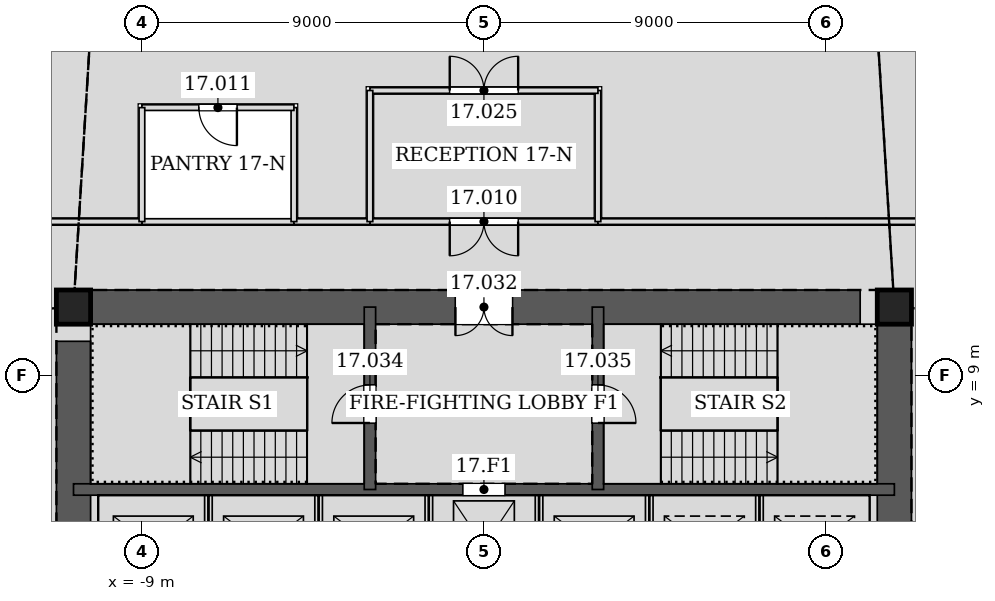
"""IFC4 building model, lengths in metres.
Left out: names, types, materials, properties, quantities, classifications, styles, units other than length and angle.
Written with IfcOpenShell. Run it as: python <this file> out.ifc"""

import sys

from ifc_helpers import new_model, si_unit, direction, frame, frame_2d, origin, origin_2d, place, context, subcontext, project, spatial, rectangle, hollow_rectangle, extrude, element, fill, save


model = new_model("IFC4")
c1 = context("Model", 3, precision=1e-05, world=origin(), true_north=direction((0.0, 1.0)))
c2 = subcontext(c1, "Body", "Model", "MODEL_VIEW")
j1 = project(units=[si_unit("LENGTHUNIT", "METRE"), si_unit("PLANEANGLEUNIT", "RADIAN")], contexts=[c1])
p1 = place(None, origin())
s1 = spatial("IfcSite", under=j1, at=p1, CompositionType="ELEMENT")
p2 = place(p1, origin())
s2 = spatial("IfcBuilding", under=s1, at=p2, CompositionType="ELEMENT")
p3 = place(p2, frame((0.0, 0.0, 79.2)))
s3 = spatial("IfcBuildingStorey", under=s2, at=p3, CompositionType="ELEMENT", Elevation=79.2)
for number, where, z_axis, x_axis in (
    (1, (10.8, 10.8, 0.0), (0.0, 0.0, 1.0), (1.0, 0.0, 0.0)),
    (2, (-10.8, 10.8, 0.0), (0.0, 0.0, 1.0), (1.0, 0.0, 0.0)),
):
    element("IfcColumn", number, at=place(p3, frame(where, z_axis=z_axis, x_axis=x_axis)), inside=s3, PredefinedType="COLUMN", context=c2, shape_type="SweptSolid", body=[
        extrude(hollow_rectangle(XDim=0.9, YDim=0.9, WallThickness=0.06, at=origin_2d()), origin(), (0.0, 0.0, 1.0), 4.2),
    ])
p4 = place(p3, frame((10.8, -10.8, 0.0), z_axis=(0.0, 0.0, 1.0), x_axis=(0.0, 1.0, 0.0)))
e3 = element("IfcWall", 3, at=p4, inside=s3, PredefinedType="SOLIDWALL", context=c2, shape_type="SweptSolid", body=[
    extrude(rectangle(XDim=21.6, YDim=0.9, at=frame_2d((10.8, 0.0))), origin(), (0.0, 0.0, 1.0), 4.2),
])
p5 = place(p4, frame((11.7, 0.0, 0.0)))
e4 = element("IfcOpeningElement", 4, at=p5, cuts=e3, PredefinedType="OPENING", context=c2, shape_type="SweptSolid", body=[
    extrude(rectangle(XDim=1.2, YDim=2.1, at=frame_2d((0.6, 1.05))), frame((0.0, 0.46, 0.0), z_axis=(0.0, -1.0, 0.0), x_axis=(1.0, 0.0, 0.0)), (0.0, 0.0, 1.0), 0.92),
])
p6 = place(p4, frame((8.7, 0.0, 0.0)))
e5 = element("IfcOpeningElement", 5, at=p6, cuts=e3, PredefinedType="OPENING", context=c2, shape_type="SweptSolid", body=[
    extrude(rectangle(XDim=1.2, YDim=2.1, at=frame_2d((0.6, 1.05))), frame((0.0, 0.46, 0.0), z_axis=(0.0, -1.0, 0.0), x_axis=(1.0, 0.0, 0.0)), (0.0, 0.0, 1.0), 0.92),
])
p7 = place(p3, frame((10.8, 10.8, 0.0), z_axis=(0.0, 0.0, 1.0), x_axis=(-1.0, 0.0, 0.0)))
e6 = element("IfcWall", 6, at=p7, inside=s3, PredefinedType="SOLIDWALL", context=c2, shape_type="SweptSolid", body=[
    extrude(rectangle(XDim=21.6, YDim=0.9, at=frame_2d((10.8, 0.0))), origin(), (0.0, 0.0, 1.0), 4.2),
])
p8 = place(p7, frame((10.05, 0.0, 0.0)))
e7 = element("IfcOpeningElement", 7, at=p8, cuts=e6, PredefinedType="OPENING", context=c2, shape_type="SweptSolid", body=[
    extrude(rectangle(XDim=1.5, YDim=2.1, at=frame_2d((0.75, 1.05))), frame((0.0, 0.46, 0.0), z_axis=(0.0, -1.0, 0.0), x_axis=(1.0, 0.0, 0.0)), (0.0, 0.0, 1.0), 0.92),
])
p9 = place(p3, frame((-10.8, 10.8, 0.0), z_axis=(0.0, 0.0, 1.0), x_axis=(0.0, -1.0, 0.0)))
e8 = element("IfcWall", 8, at=p9, inside=s3, PredefinedType="SOLIDWALL", context=c2, shape_type="SweptSolid", body=[
    extrude(rectangle(XDim=21.6, YDim=0.9, at=frame_2d((10.8, 0.0))), origin(), (0.0, 0.0, 1.0), 4.2),
])
p10 = place(p9, frame((8.7, 0.0, 0.0)))
e9 = element("IfcOpeningElement", 9, at=p10, cuts=e8, PredefinedType="OPENING", context=c2, shape_type="SweptSolid", body=[
    extrude(rectangle(XDim=1.2, YDim=2.1, at=frame_2d((0.6, 1.05))), frame((0.0, 0.46, 0.0), z_axis=(0.0, -1.0, 0.0), x_axis=(1.0, 0.0, 0.0)), (0.0, 0.0, 1.0), 0.92),
])
p11 = place(p9, frame((11.7, 0.0, 0.0)))
e10 = element("IfcOpeningElement", 10, at=p11, cuts=e8, PredefinedType="OPENING", context=c2, shape_type="SweptSolid", body=[
    extrude(rectangle(XDim=1.2, YDim=2.1, at=frame_2d((0.6, 1.05))), frame((0.0, 0.46, 0.0), z_axis=(0.0, -1.0, 0.0), x_axis=(1.0, 0.0, 0.0)), (0.0, 0.0, 1.0), 0.92),
])
p12 = place(p3, frame((-10.8, 6.0, 0.0), z_axis=(0.0, 0.0, 1.0), x_axis=(1.0, 0.0, 0.0)))
e11 = element("IfcWall", 11, at=p12, inside=s3, PredefinedType="SOLIDWALL", context=c2, shape_type="SweptSolid", body=[
    extrude(rectangle(XDim=21.6, YDim=0.3, at=frame_2d((10.8, 0.0))), origin(), (0.0, 0.0, 1.0), 4.2),
])
p13 = place(p12, frame((10.25, 0.0, 0.0)))
e12 = element("IfcOpeningElement", 12, at=p13, cuts=e11, PredefinedType="OPENING", context=c2, shape_type="SweptSolid", body=[
    extrude(rectangle(XDim=1.1, YDim=2.1, at=frame_2d((0.55, 1.05))), frame((0.0, 0.16, 0.0), z_axis=(0.0, -1.0, 0.0), x_axis=(1.0, 0.0, 0.0)), (0.0, 0.0, 1.0), 0.32),
])
p14 = place(p3, frame((-3.0, 6.0, 0.0), z_axis=(0.0, 0.0, 1.0), x_axis=(0.0, 1.0, 0.0)))
e13 = element("IfcWall", 13, at=p14, inside=s3, PredefinedType="SOLIDWALL", context=c2, shape_type="SweptSolid", body=[
    extrude(rectangle(XDim=4.8, YDim=0.3, at=frame_2d((2.4, 0.0))), origin(), (0.0, 0.0, 1.0), 4.2),
])
p15 = place(p14, frame((1.75, 0.0, 0.0)))
e14 = element("IfcOpeningElement", 14, at=p15, cuts=e13, PredefinedType="OPENING", context=c2, shape_type="SweptSolid", body=[
    extrude(rectangle(XDim=1.0, YDim=2.1, at=frame_2d((0.5, 1.05))), frame((0.0, 0.16, 0.0), z_axis=(0.0, -1.0, 0.0), x_axis=(1.0, 0.0, 0.0)), (0.0, 0.0, 1.0), 0.32),
])
p16 = place(p3, frame((3.0, 6.0, 0.0), z_axis=(0.0, 0.0, 1.0), x_axis=(0.0, 1.0, 0.0)))
e15 = element("IfcWall", 15, at=p16, inside=s3, PredefinedType="SOLIDWALL", context=c2, shape_type="SweptSolid", body=[
    extrude(rectangle(XDim=4.8, YDim=0.3, at=frame_2d((2.4, 0.0))), origin(), (0.0, 0.0, 1.0), 4.2),
])
p17 = place(p16, frame((1.75, 0.0, 0.0)))
e16 = element("IfcOpeningElement", 16, at=p17, cuts=e15, PredefinedType="OPENING", context=c2, shape_type="SweptSolid", body=[
    extrude(rectangle(XDim=1.0, YDim=2.1, at=frame_2d((0.5, 1.05))), frame((0.0, 0.16, 0.0), z_axis=(0.0, -1.0, 0.0), x_axis=(1.0, 0.0, 0.0)), (0.0, 0.0, 1.0), 0.32),
])
p18 = place(p3, frame((3.001, 13.05, 0.0), z_axis=(0.0, 0.0, 1.0), x_axis=(-1.0, 0.0, 0.0)))
e17 = element("IfcWall", 17, at=p18, inside=s3, PredefinedType="PARTITIONING", context=c2, shape_type="SweptSolid", body=[
    extrude(rectangle(XDim=6.002, YDim=0.15, at=frame_2d((3.001, 0.0))), origin(), (0.0, 0.0, 1.0), 3.065),
])
p19 = place(p18, frame((2.101, 0.0, 0.0)))
e18 = element("IfcOpeningElement", 18, at=p19, cuts=e17, PredefinedType="OPENING", context=c2, shape_type="SweptSolid", body=[
    extrude(rectangle(XDim=1.8, YDim=2.4, at=frame_2d((0.9, 1.2))), frame((0.0, 0.085, 0.0), z_axis=(0.0, -1.0, 0.0), x_axis=(1.0, 0.0, 0.0)), (0.0, 0.0, 1.0), 0.17),
])
p20 = place(p3, frame((-4.999, 13.05, 0.0), z_axis=(0.0, 0.0, 1.0), x_axis=(-1.0, 0.0, 0.0)))
e19 = element("IfcWall", 19, at=p20, inside=s3, PredefinedType="PARTITIONING", context=c2, shape_type="SweptSolid", body=[
    extrude(rectangle(XDim=4.002, YDim=0.15, at=frame_2d((2.001, 0.0))), origin(), (0.0, 0.0, 1.0), 4.035),
])
p21 = place(p3, frame((-8.999, 13.05, 0.0), z_axis=(0.0, 0.0, 1.0), x_axis=(-1.0, 0.0, 0.0)))
e20 = element("IfcWall", 20, at=p21, inside=s3, PredefinedType="PARTITIONING", context=c2, shape_type="SweptSolid", body=[
    extrude(rectangle(XDim=4.051, YDim=0.15, at=frame_2d((2.025, 0.0))), origin(), (0.0, 0.0, 1.0), 3.014),
])
p22 = place(p3, frame((-2.999, 13.05, 0.0), z_axis=(0.0, 0.0, 1.0), x_axis=(-1.0, 0.0, 0.0)))
e21 = element("IfcWall", 21, at=p22, inside=s3, PredefinedType="PARTITIONING", context=c2, shape_type="SweptSolid", body=[
    extrude(rectangle(XDim=2.002, YDim=0.15, at=frame_2d((1.001, 0.0))), origin(), (0.0, 0.0, 1.0), 4.035),
])
p23 = place(p3, frame((13.05, 13.05, 0.0), z_axis=(0.0, 0.0, 1.0), x_axis=(-1.0, 0.0, 0.0)))
e22 = element("IfcWall", 22, at=p23, inside=s3, PredefinedType="PARTITIONING", context=c2, shape_type="SweptSolid", body=[
    extrude(rectangle(XDim=10.051, YDim=0.15, at=frame_2d((5.025, 0.0))), origin(), (0.0, 0.0, 1.0), 3.014),
])
p24 = place(p3, frame((3.0, 13.05, 0.0), z_axis=(0.0, 0.0, 1.0), x_axis=(0.0, 1.0, 0.0)))
e23 = element("IfcWall", 23, at=p24, inside=s3, PredefinedType="PARTITIONING", context=c2, shape_type="SweptSolid", body=[
    extrude(rectangle(XDim=3.45, YDim=0.15, at=frame_2d((1.725, 0.0))), origin(), (0.0, 0.0, 1.0), 3.492),
])
p25 = place(p3, frame((3.0, 16.5, 0.0), z_axis=(0.0, 0.0, 1.0), x_axis=(-1.0, 0.0, 0.0)))
e24 = element("IfcWall", 24, at=p25, inside=s3, PredefinedType="PARTITIONING", context=c2, shape_type="SweptSolid", body=[
    extrude(rectangle(XDim=6.0, YDim=0.15, at=frame_2d((3.0, 0.0))), origin(), (0.0, 0.0, 1.0), 3.065),
])
p26 = place(p25, frame((2.1, 0.0, 0.0)))
e25 = element("IfcOpeningElement", 25, at=p26, cuts=e24, PredefinedType="OPENING", context=c2, shape_type="SweptSolid", body=[
    extrude(rectangle(XDim=1.8, YDim=2.4, at=frame_2d((0.9, 1.2))), frame((0.0, 0.085, 0.0), z_axis=(0.0, -1.0, 0.0), x_axis=(1.0, 0.0, 0.0)), (0.0, 0.0, 1.0), 0.17),
])
p27 = place(p3, frame((-3.0, 16.5, 0.0), z_axis=(0.0, 0.0, 1.0), x_axis=(0.0, -1.0, 0.0)))
e26 = element("IfcWall", 26, at=p27, inside=s3, PredefinedType="PARTITIONING", context=c2, shape_type="SweptSolid", body=[
    extrude(rectangle(XDim=3.45, YDim=0.15, at=frame_2d((1.725, 0.0))), origin(), (0.0, 0.0, 1.0), 3.492),
])
p28 = place(p3, frame((-5.0, 13.05, 0.0), z_axis=(0.0, 0.0, 1.0), x_axis=(0.0, 1.0, 0.0)))
e27 = element("IfcWall", 27, at=p28, inside=s3, PredefinedType="PARTITIONING", context=c2, shape_type="SweptSolid", body=[
    extrude(rectangle(XDim=3.0, YDim=0.15, at=frame_2d((1.5, 0.0))), origin(), (0.0, 0.0, 1.0), 3.492),
])
p29 = place(p3, frame((-5.0, 16.05, 0.0), z_axis=(0.0, 0.0, 1.0), x_axis=(-1.0, 0.0, 0.0)))
e28 = element("IfcWall", 28, at=p29, inside=s3, PredefinedType="PARTITIONING", context=c2, shape_type="SweptSolid", body=[
    extrude(rectangle(XDim=4.0, YDim=0.15, at=frame_2d((2.0, 0.0))), origin(), (0.0, 0.0, 1.0), 4.035),
])
p30 = place(p29, frame((1.5, 0.0, 0.0)))
e29 = element("IfcOpeningElement", 29, at=p30, cuts=e28, PredefinedType="OPENING", context=c2, shape_type="SweptSolid", body=[
    extrude(rectangle(XDim=1.0, YDim=2.1, at=frame_2d((0.5, 1.05))), frame((0.0, 0.085, 0.0), z_axis=(0.0, -1.0, 0.0), x_axis=(1.0, 0.0, 0.0)), (0.0, 0.0, 1.0), 0.17),
])
p31 = place(p3, frame((-9.0, 16.05, 0.0), z_axis=(0.0, 0.0, 1.0), x_axis=(0.0, -1.0, 0.0)))
e30 = element("IfcWall", 30, at=p31, inside=s3, PredefinedType="PARTITIONING", context=c2, shape_type="SweptSolid", body=[
    extrude(rectangle(XDim=3.0, YDim=0.15, at=frame_2d((1.5, 0.0))), origin(), (0.0, 0.0, 1.0), 3.492),
])
for number, where, z_axis, x_axis in (
    (31, (-7.25, 3.15, 0.0), (0.0, 0.0, 1.0), (0.0, 1.0, 0.0)),
    (32, (-4.35, 3.15, 0.0), (0.0, 0.0, 1.0), (0.0, 1.0, 0.0)),
    (33, (-1.45, 3.15, 0.0), (0.0, 0.0, 1.0), (0.0, 1.0, 0.0)),
    (34, (1.45, 3.15, 0.0), (0.0, 0.0, 1.0), (0.0, 1.0, 0.0)),
    (35, (4.35, 3.15, 0.0), (0.0, 0.0, 1.0), (0.0, 1.0, 0.0)),
    (36, (7.25, 3.15, 0.0), (0.0, 0.0, 1.0), (0.0, 1.0, 0.0)),
):
    element("IfcWall", number, at=place(p3, frame(where, z_axis=z_axis, x_axis=x_axis)), inside=s3, PredefinedType="PARTITIONING", context=c2, shape_type="SweptSolid", body=[
        extrude(rectangle(XDim=2.7, YDim=0.2, at=frame_2d((1.35, 0.0))), origin(), (0.0, 0.0, 1.0), 4.2),
    ])
p32 = place(p19, origin())
e37 = element("IfcDoor", 37, at=p32, inside=s3, OperationType="DOUBLE_DOOR_SINGLE_SWING", PredefinedType="DOOR", context=c2, shape_type="SweptSolid", body=[
    extrude(rectangle(XDim=1.8, YDim=2.4, at=frame_2d((0.9, 1.2))), frame((0.0, 0.025, 0.0), z_axis=(0.0, -1.0, 0.0), x_axis=(1.0, 0.0, 0.0)), (0.0, 0.0, 1.0), 0.05),
])
fill(e18, e37)
p33 = place(p30, origin())
e38 = element("IfcDoor", 38, at=p33, inside=s3, OperationType="SINGLE_SWING_LEFT", PredefinedType="DOOR", context=c2, shape_type="SweptSolid", body=[
    extrude(rectangle(XDim=1.0, YDim=2.1, at=frame_2d((0.5, 1.05))), frame((0.0, 0.025, 0.0), z_axis=(0.0, -1.0, 0.0), x_axis=(1.0, 0.0, 0.0)), (0.0, 0.0, 1.0), 0.05),
])
fill(e29, e38)
p34 = place(p26, frame((1.8, 0.0, 0.0), z_axis=(0.0, 0.0, 1.0), x_axis=(-1.0, 0.0, 0.0)))
e39 = element("IfcDoor", 39, at=p34, inside=s3, OperationType="DOUBLE_DOOR_SINGLE_SWING", PredefinedType="DOOR", context=c2, shape_type="SweptSolid", body=[
    extrude(rectangle(XDim=1.8, YDim=2.4, at=frame_2d((0.9, 1.2))), frame((0.0, 0.025, 0.0), z_axis=(0.0, -1.0, 0.0), x_axis=(1.0, 0.0, 0.0)), (0.0, 0.0, 1.0), 0.05),
])
fill(e25, e39)
p35 = place(p8, origin())
e40 = element("IfcDoor", 40, at=p35, inside=s3, OperationType="DOUBLE_DOOR_SINGLE_SWING", PredefinedType="DOOR", context=c2, shape_type="SweptSolid", body=[
    extrude(rectangle(XDim=1.5, YDim=2.1, at=frame_2d((0.75, 1.05))), frame((0.0, 0.025, 0.0), z_axis=(0.0, -1.0, 0.0), x_axis=(1.0, 0.0, 0.0)), (0.0, 0.0, 1.0), 0.05),
])
fill(e7, e40)
p36 = place(p15, origin())
e41 = element("IfcDoor", 41, at=p36, inside=s3, OperationType="SINGLE_SWING_LEFT", PredefinedType="DOOR", context=c2, shape_type="SweptSolid", body=[
    extrude(rectangle(XDim=1.0, YDim=2.1, at=frame_2d((0.5, 1.05))), frame((0.0, 0.025, 0.0), z_axis=(0.0, -1.0, 0.0), x_axis=(1.0, 0.0, 0.0)), (0.0, 0.0, 1.0), 0.05),
])
fill(e14, e41)
p37 = place(p17, frame((1.0, 0.0, 0.0), z_axis=(0.0, 0.0, 1.0), x_axis=(-1.0, 0.0, 0.0)))
e42 = element("IfcDoor", 42, at=p37, inside=s3, OperationType="SINGLE_SWING_RIGHT", PredefinedType="DOOR", context=c2, shape_type="SweptSolid", body=[
    extrude(rectangle(XDim=1.0, YDim=2.1, at=frame_2d((0.5, 1.05))), frame((0.0, 0.025, 0.0), z_axis=(0.0, -1.0, 0.0), x_axis=(1.0, 0.0, 0.0)), (0.0, 0.0, 1.0), 0.05),
])
fill(e16, e42)
p38 = place(p13, origin())
e43 = element("IfcDoor", 43, at=p38, inside=s3, OperationType="DOUBLE_DOOR_SLIDING", PredefinedType="DOOR", context=c2, shape_type="SweptSolid", body=[
    extrude(rectangle(XDim=1.1, YDim=2.1, at=frame_2d((0.55, 1.05))), frame((0.0, 0.025, 0.0), z_axis=(0.0, -1.0, 0.0), x_axis=(1.0, 0.0, 0.0)), (0.0, 0.0, 1.0), 0.05),
])
fill(e12, e43)
save(model, sys.argv[1])
